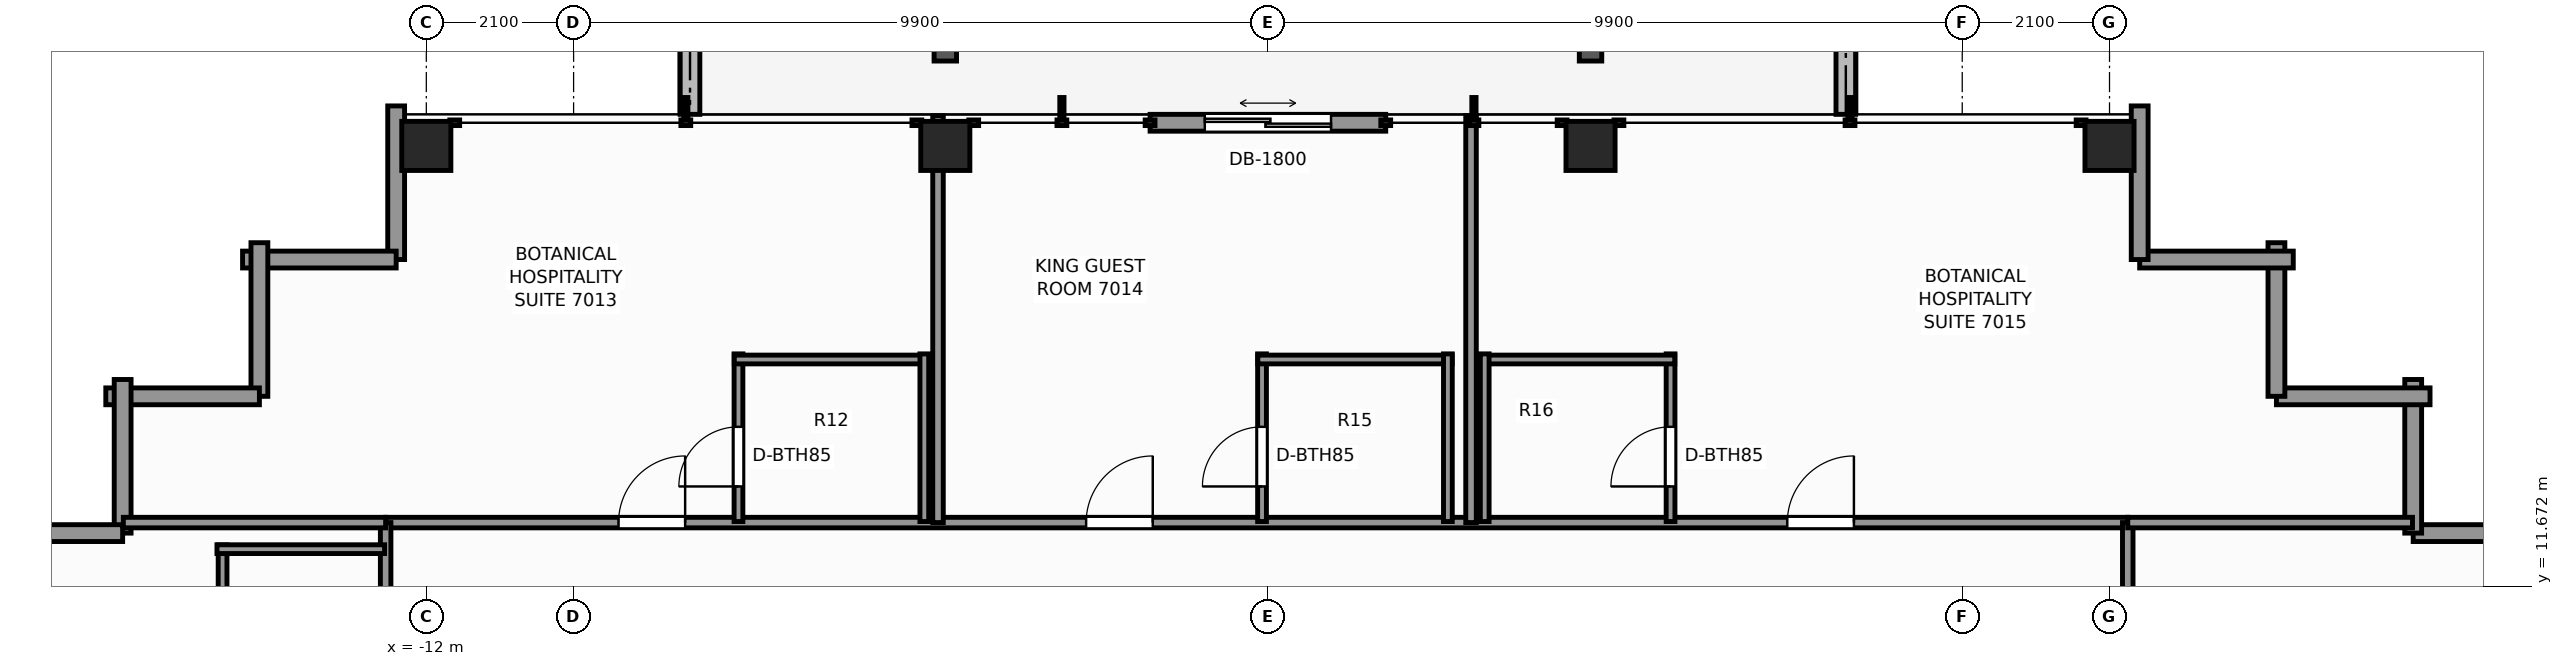
"""IFC4 building model, lengths in metres.
Left out: names, types, materials, properties, quantities, classifications, styles, units other than length and angle.
Written with IfcOpenShell. Run it as: python <this file> out.ifc"""

import sys

from ifc_helpers import new_model, si_unit, direction, frame, frame_2d, origin, origin_2d, place, context, subcontext, project, spatial, rectangle, extrude, element, fill, save


model = new_model("IFC4")
c1 = context("Model", 3, precision=1e-05, world=origin(), true_north=direction((0.0, 1.0)))
c2 = subcontext(c1, "Body", "Model", "MODEL_VIEW")
j1 = project(units=[si_unit("LENGTHUNIT", "METRE"), si_unit("PLANEANGLEUNIT", "RADIAN")], contexts=[c1])
p1 = place(None, origin())
s1 = spatial("IfcSite", under=j1, at=p1, CompositionType="ELEMENT")
p2 = place(p1, origin())
s2 = spatial("IfcBuilding", under=s1, at=p2, CompositionType="ELEMENT")
p3 = place(p2, frame((0.0, 0.0, 240.9)))
s3 = spatial("IfcBuildingStorey", under=s2, at=p3, CompositionType="ELEMENT", Elevation=240.9)
for number, where, z_axis, x_axis in (
    (1, (-12.0, 17.95, 0.0), (0.0, 0.0, 1.0), (1.0, 0.0, 0.0)),
    (2, (-4.6, 17.95, 0.0), (0.0, 0.0, 1.0), (1.0, 0.0, 0.0)),
    (3, (4.6, 17.95, 0.0), (0.0, 0.0, 1.0), (1.0, 0.0, 0.0)),
    (4, (12.0, 17.95, 0.0), (0.0, 0.0, 1.0), (1.0, 0.0, 0.0)),
):
    element("IfcColumn", number, at=place(p3, frame(where, z_axis=z_axis, x_axis=x_axis)), inside=s3, PredefinedType="COLUMN", context=c2, shape_type="SweptSolid", body=[
        extrude(rectangle(XDim=0.7, YDim=0.7, at=origin_2d()), origin(), (0.0, 0.0, 1.0), 3.5),
    ])
p4 = place(p3, frame((8.24, 18.4, -0.07), z_axis=(0.0, 0.0, 1.0), x_axis=(0.0, 1.0, 0.0)))
e5 = element("IfcWall", 5, at=p4, inside=s3, PredefinedType="PARAPET", context=c2, shape_type="SweptSolid", body=[
    extrude(rectangle(XDim=1.313, YDim=0.28, at=frame_2d((0.656, 0.0))), origin(), (0.0, 0.0, 1.0), 0.42),
])
p5 = place(p3, frame((-8.24, 20.74, -0.07), z_axis=(0.0, 0.0, 1.0), x_axis=(0.0, -1.0, 0.0)))
e6 = element("IfcWall", 6, at=p5, inside=s3, PredefinedType="PARAPET", context=c2, shape_type="SweptSolid", body=[
    extrude(rectangle(XDim=2.34, YDim=0.28, at=frame_2d((1.17, 0.0))), origin(), (0.0, 0.0, 1.0), 0.42),
])
p6 = place(p3, frame((16.33, 12.43, 0.0), z_axis=(0.0, 0.0, 1.0), x_axis=(1.0, 0.0, 0.0)))
e7 = element("IfcWall", 7, at=p6, inside=s3, PredefinedType="STANDARD", context=c2, shape_type="SweptSolid", body=[
    extrude(rectangle(XDim=2.19, YDim=0.24, at=frame_2d((1.095, 0.0))), origin(), (0.0, 0.0, 1.0), 2.633),
])
for number, where, z_axis, x_axis in (
    (8, (16.33, 14.62, 0.0), (0.0, 0.0, 1.0), (0.0, -1.0, 0.0)),
    (9, (14.38, 14.38, 0.0), (0.0, 0.0, 1.0), (1.0, 0.0, 0.0)),
    (10, (14.38, 16.57, 0.0), (0.0, 0.0, 1.0), (0.0, -1.0, 0.0)),
    (11, (12.43, 16.33, 0.0), (0.0, 0.0, 1.0), (1.0, 0.0, 0.0)),
):
    element("IfcWall", number, at=place(p3, frame(where, z_axis=z_axis, x_axis=x_axis)), inside=s3, PredefinedType="STANDARD", context=c2, shape_type="SweptSolid", body=[
        extrude(rectangle(XDim=2.19, YDim=0.24, at=frame_2d((1.095, 0.0))), origin(), (0.0, 0.0, 1.0), 2.633),
    ])
p7 = place(p3, frame((12.43, 18.52, 0.0), z_axis=(0.0, 0.0, 1.0), x_axis=(0.0, -1.0, 0.0)))
e12 = element("IfcWall", 12, at=p7, inside=s3, PredefinedType="STANDARD", context=c2, shape_type="SweptSolid", body=[
    extrude(rectangle(XDim=2.19, YDim=0.24, at=frame_2d((1.095, 0.0))), origin(), (0.0, 0.0, 1.0), 2.633),
])
p8 = place(p3, frame((-1.68, 18.28, 0.0), z_axis=(0.0, 0.0, 1.0), x_axis=(1.0, 0.0, 0.0)))
e13 = element("IfcWall", 13, at=p8, inside=s3, PredefinedType="STANDARD", context=c2, shape_type="SweptSolid", body=[
    extrude(rectangle(XDim=3.36, YDim=0.24, at=frame_2d((1.68, 0.0))), origin(), (0.0, 0.0, 1.0), 3.25),
])
p9 = place(p8, frame((0.78, 0.0, 0.0)))
e14 = element("IfcOpeningElement", 14, at=p9, cuts=e13, PredefinedType="OPENING", context=c2, shape_type="SweptSolid", body=[
    extrude(rectangle(XDim=1.8, YDim=2.2, at=frame_2d((0.9, 1.1))), frame((0.0, 0.13, 0.0), z_axis=(0.0, -1.0, 0.0), x_axis=(1.0, 0.0, 0.0)), (0.0, 0.0, 1.0), 0.26),
])
p10 = place(p3, frame((-12.43, 16.33, 0.0), z_axis=(0.0, 0.0, 1.0), x_axis=(0.0, 1.0, 0.0)))
e15 = element("IfcWall", 15, at=p10, inside=s3, PredefinedType="STANDARD", context=c2, shape_type="SweptSolid", body=[
    extrude(rectangle(XDim=2.19, YDim=0.24, at=frame_2d((1.095, 0.0))), origin(), (0.0, 0.0, 1.0), 2.633),
])
for number, where, z_axis, x_axis in (
    (16, (-14.62, 16.33, 0.0), (0.0, 0.0, 1.0), (1.0, 0.0, 0.0)),
    (17, (-14.38, 14.38, 0.0), (0.0, 0.0, 1.0), (0.0, 1.0, 0.0)),
    (18, (-16.57, 14.38, 0.0), (0.0, 0.0, 1.0), (1.0, 0.0, 0.0)),
    (19, (-16.33, 12.43, 0.0), (0.0, 0.0, 1.0), (0.0, 1.0, 0.0)),
):
    element("IfcWall", number, at=place(p3, frame(where, z_axis=z_axis, x_axis=x_axis)), inside=s3, PredefinedType="STANDARD", context=c2, shape_type="SweptSolid", body=[
        extrude(rectangle(XDim=2.19, YDim=0.24, at=frame_2d((1.095, 0.0))), origin(), (0.0, 0.0, 1.0), 2.633),
    ])
p11 = place(p3, frame((-18.52, 12.43, 0.0), z_axis=(0.0, 0.0, 1.0), x_axis=(1.0, 0.0, 0.0)))
e20 = element("IfcWall", 20, at=p11, inside=s3, PredefinedType="STANDARD", context=c2, shape_type="SweptSolid", body=[
    extrude(rectangle(XDim=2.19, YDim=0.24, at=frame_2d((1.095, 0.0))), origin(), (0.0, 0.0, 1.0), 2.633),
])
p12 = place(p3, frame((-12.58, 12.58, 0.0), z_axis=(0.0, 0.0, 1.0), x_axis=(1.0, 0.0, 0.0)))
e21 = element("IfcWall", 21, at=p12, inside=s3, PredefinedType="PARTITIONING", context=c2, shape_type="SweptSolid", body=[
    extrude(rectangle(XDim=24.84, YDim=0.15, at=frame_2d((12.42, 0.0))), origin(), (0.0, 0.0, 1.0), 2.539),
])
p13 = place(p12, frame((3.321, 0.0, 0.0)))
e22 = element("IfcOpeningElement", 22, at=p13, cuts=e21, PredefinedType="OPENING", context=c2, shape_type="SweptSolid", body=[
    extrude(rectangle(XDim=0.95, YDim=2.06, at=frame_2d((0.475, 1.03))), frame((0.0, 0.085, 0.0), z_axis=(0.0, -1.0, 0.0), x_axis=(1.0, 0.0, 0.0)), (0.0, 0.0, 1.0), 0.17),
])
p14 = place(p12, frame((9.988, 0.0, 0.0)))
e23 = element("IfcOpeningElement", 23, at=p14, cuts=e21, PredefinedType="OPENING", context=c2, shape_type="SweptSolid", body=[
    extrude(rectangle(XDim=0.95, YDim=2.06, at=frame_2d((0.475, 1.03))), frame((0.0, 0.085, 0.0), z_axis=(0.0, -1.0, 0.0), x_axis=(1.0, 0.0, 0.0)), (0.0, 0.0, 1.0), 0.17),
])
p15 = place(p12, frame((19.986, 0.0, 0.0)))
e24 = element("IfcOpeningElement", 24, at=p15, cuts=e21, PredefinedType="OPENING", context=c2, shape_type="SweptSolid", body=[
    extrude(rectangle(XDim=0.95, YDim=2.06, at=frame_2d((0.475, 1.03))), frame((0.0, 0.085, 0.0), z_axis=(0.0, -1.0, 0.0), x_axis=(1.0, 0.0, 0.0)), (0.0, 0.0, 1.0), 0.17),
])
p16 = place(p3, frame((-12.58, -12.26, 0.0), z_axis=(0.0, 0.0, 1.0), x_axis=(0.0, 1.0, 0.0)))
e25 = element("IfcWall", 25, at=p16, inside=s3, PredefinedType="PARTITIONING", context=c2, shape_type="SweptSolid", body=[
    extrude(rectangle(XDim=24.84, YDim=0.15, at=frame_2d((12.42, 0.0))), origin(), (0.0, 0.0, 1.0), 2.539),
])
p17 = place(p16, frame((2.686, 0.0, 0.0)))
e26 = element("IfcOpeningElement", 26, at=p17, cuts=e25, PredefinedType="OPENING", context=c2, shape_type="SweptSolid", body=[
    extrude(rectangle(XDim=0.9, YDim=2.06, at=frame_2d((0.45, 1.03))), frame((0.0, 0.085, 0.0), z_axis=(0.0, -1.0, 0.0), x_axis=(1.0, 0.0, 0.0)), (0.0, 0.0, 1.0), 0.17),
])
p18 = place(p16, frame((4.385, 0.0, 0.0)))
e27 = element("IfcOpeningElement", 27, at=p18, cuts=e25, PredefinedType="OPENING", context=c2, shape_type="SweptSolid", body=[
    extrude(rectangle(XDim=0.95, YDim=2.06, at=frame_2d((0.475, 1.03))), frame((0.0, 0.085, 0.0), z_axis=(0.0, -1.0, 0.0), x_axis=(1.0, 0.0, 0.0)), (0.0, 0.0, 1.0), 0.17),
])
p19 = place(p16, frame((13.796, 0.0, 0.0)))
e28 = element("IfcOpeningElement", 28, at=p19, cuts=e25, PredefinedType="OPENING", context=c2, shape_type="SweptSolid", body=[
    extrude(rectangle(XDim=0.95, YDim=2.06, at=frame_2d((0.475, 1.03))), frame((0.0, 0.085, 0.0), z_axis=(0.0, -1.0, 0.0), x_axis=(1.0, 0.0, 0.0)), (0.0, 0.0, 1.0), 0.17),
])
p20 = place(p16, frame((18.242, 0.0, 0.0)))
e29 = element("IfcOpeningElement", 29, at=p20, cuts=e25, PredefinedType="OPENING", context=c2, shape_type="SweptSolid", body=[
    extrude(rectangle(XDim=0.9, YDim=2.06, at=frame_2d((0.45, 1.03))), frame((0.0, 0.085, 0.0), z_axis=(0.0, -1.0, 0.0), x_axis=(1.0, 0.0, 0.0)), (0.0, 0.0, 1.0), 0.17),
])
p21 = place(p16, frame((20.059, 0.0, 0.0)))
e30 = element("IfcOpeningElement", 30, at=p21, cuts=e25, PredefinedType="OPENING", context=c2, shape_type="SweptSolid", body=[
    extrude(rectangle(XDim=0.95, YDim=2.06, at=frame_2d((0.475, 1.03))), frame((0.0, 0.085, 0.0), z_axis=(0.0, -1.0, 0.0), x_axis=(1.0, 0.0, 0.0)), (0.0, 0.0, 1.0), 0.17),
])
p22 = place(p3, frame((12.26, -12.26, 0.0), z_axis=(0.0, 0.0, 1.0), x_axis=(0.0, 1.0, 0.0)))
e31 = element("IfcWall", 31, at=p22, inside=s3, PredefinedType="PARTITIONING", context=c2, shape_type="SweptSolid", body=[
    extrude(rectangle(XDim=24.84, YDim=0.15, at=frame_2d((12.42, 0.0))), origin(), (0.0, 0.0, 1.0), 2.539),
])
p23 = place(p22, frame((4.275, 0.0, 0.0)))
e32 = element("IfcOpeningElement", 32, at=p23, cuts=e31, PredefinedType="OPENING", context=c2, shape_type="SweptSolid", body=[
    extrude(rectangle(XDim=0.9, YDim=2.06, at=frame_2d((0.45, 1.03))), frame((0.0, 0.085, 0.0), z_axis=(0.0, -1.0, 0.0), x_axis=(1.0, 0.0, 0.0)), (0.0, 0.0, 1.0), 0.17),
])
p24 = place(p22, frame((9.966, 0.0, 0.0)))
e33 = element("IfcOpeningElement", 33, at=p24, cuts=e31, PredefinedType="OPENING", context=c2, shape_type="SweptSolid", body=[
    extrude(rectangle(XDim=0.95, YDim=2.06, at=frame_2d((0.475, 1.03))), frame((0.0, 0.085, 0.0), z_axis=(0.0, -1.0, 0.0), x_axis=(1.0, 0.0, 0.0)), (0.0, 0.0, 1.0), 0.17),
])
p25 = place(p22, frame((18.653, 0.0, 0.0)))
e34 = element("IfcOpeningElement", 34, at=p25, cuts=e31, PredefinedType="OPENING", context=c2, shape_type="SweptSolid", body=[
    extrude(rectangle(XDim=0.95, YDim=2.06, at=frame_2d((0.475, 1.03))), frame((0.0, 0.085, 0.0), z_axis=(0.0, -1.0, 0.0), x_axis=(1.0, 0.0, 0.0)), (0.0, 0.0, 1.0), 0.17),
])
p26 = place(p22, frame((20.836, 0.0, 0.0)))
e35 = element("IfcOpeningElement", 35, at=p26, cuts=e31, PredefinedType="OPENING", context=c2, shape_type="SweptSolid", body=[
    extrude(rectangle(XDim=0.9, YDim=2.06, at=frame_2d((0.45, 1.03))), frame((0.0, 0.085, 0.0), z_axis=(0.0, -1.0, 0.0), x_axis=(1.0, 0.0, 0.0)), (0.0, 0.0, 1.0), 0.17),
])
p27 = place(p3, frame((-16.32, 12.58, 0.0), z_axis=(0.0, 0.0, 1.0), x_axis=(1.0, 0.0, 0.0)))
e36 = element("IfcWall", 36, at=p27, inside=s3, PredefinedType="PARTITIONING", context=c2, shape_type="SweptSolid", body=[
    extrude(rectangle(XDim=3.74, YDim=0.15, at=frame_2d((1.87, 0.0))), origin(), (0.0, 0.0, 1.0), 3.25),
])
p28 = place(p3, frame((12.26, 12.58, 0.0), z_axis=(0.0, 0.0, 1.0), x_axis=(1.0, 0.0, 0.0)))
e37 = element("IfcWall", 37, at=p28, inside=s3, PredefinedType="PARTITIONING", context=c2, shape_type="SweptSolid", body=[
    extrude(rectangle(XDim=4.06, YDim=0.15, at=frame_2d((2.03, 0.0))), origin(), (0.0, 0.0, 1.0), 3.25),
])
p29 = place(p3, frame((-14.905, 9.491, 0.0), z_axis=(0.0, 0.0, 1.0), x_axis=(0.0, 1.0, 0.0)))
e38 = element("IfcWall", 38, at=p29, inside=s3, PredefinedType="PARTITIONING", context=c2, shape_type="SweptSolid", body=[
    extrude(rectangle(XDim=2.77, YDim=0.125, at=frame_2d((1.385, 0.0))), origin(), (0.0, 0.0, 1.0), 2.539),
])
p30 = place(p3, frame((-14.985, 12.201, 0.0), z_axis=(0.0, 0.0, 1.0), x_axis=(1.0, 0.0, 0.0)))
e39 = element("IfcWall", 39, at=p30, inside=s3, PredefinedType="PARTITIONING", context=c2, shape_type="SweptSolid", body=[
    extrude(rectangle(XDim=2.39, YDim=0.125, at=frame_2d((1.195, 0.0))), origin(), (0.0, 0.0, 1.0), 3.25),
])
p31 = place(p3, frame((-4.704, 12.58, 0.0), z_axis=(0.0, 0.0, 1.0), x_axis=(0.0, 1.0, 0.0)))
e40 = element("IfcWall", 40, at=p31, inside=s3, PredefinedType="PARTITIONING", context=c2, shape_type="SweptSolid", body=[
    extrude(rectangle(XDim=5.8, YDim=0.15, at=frame_2d((2.9, 0.0))), origin(), (0.0, 0.0, 1.0), 2.539),
])
p32 = place(p3, frame((-7.549, 12.595, 0.0), z_axis=(0.0, 0.0, 1.0), x_axis=(0.0, 1.0, 0.0)))
e41 = element("IfcWall", 41, at=p32, inside=s3, PredefinedType="PARTITIONING", context=c2, shape_type="SweptSolid", body=[
    extrude(rectangle(XDim=2.39, YDim=0.125, at=frame_2d((1.195, 0.0))), origin(), (0.0, 0.0, 1.0), 3.25),
])
p33 = place(p32, frame((0.5, 0.0, 0.0)))
e42 = element("IfcOpeningElement", 42, at=p33, cuts=e41, PredefinedType="OPENING", context=c2, shape_type="SweptSolid", body=[
    extrude(rectangle(XDim=0.85, YDim=2.03, at=frame_2d((0.425, 1.015))), frame((0.0, 0.073, 0.0), z_axis=(0.0, -1.0, 0.0), x_axis=(1.0, 0.0, 0.0)), (0.0, 0.0, 1.0), 0.145),
])
p34 = place(p3, frame((-7.609, 14.905, 0.0), z_axis=(0.0, 0.0, 1.0), x_axis=(1.0, 0.0, 0.0)))
e43 = element("IfcWall", 43, at=p34, inside=s3, PredefinedType="PARTITIONING", context=c2, shape_type="SweptSolid", body=[
    extrude(rectangle(XDim=2.77, YDim=0.125, at=frame_2d((1.385, 0.0))), origin(), (0.0, 0.0, 1.0), 3.25),
])
p35 = place(p3, frame((-4.899, 12.595, 0.0), z_axis=(0.0, 0.0, 1.0), x_axis=(0.0, 1.0, 0.0)))
e44 = element("IfcWall", 44, at=p35, inside=s3, PredefinedType="PARTITIONING", context=c2, shape_type="SweptSolid", body=[
    extrude(rectangle(XDim=2.39, YDim=0.125, at=frame_2d((1.195, 0.0))), origin(), (0.0, 0.0, 1.0), 3.25),
])
p36 = place(p3, frame((2.896, 12.58, 0.0), z_axis=(0.0, 0.0, 1.0), x_axis=(0.0, 1.0, 0.0)))
e45 = element("IfcWall", 45, at=p36, inside=s3, PredefinedType="PARTITIONING", context=c2, shape_type="SweptSolid", body=[
    extrude(rectangle(XDim=5.8, YDim=0.15, at=frame_2d((2.9, 0.0))), origin(), (0.0, 0.0, 1.0), 2.623),
])
p37 = place(p3, frame((-0.084, 12.595, 0.0), z_axis=(0.0, 0.0, 1.0), x_axis=(0.0, 1.0, 0.0)))
e46 = element("IfcWall", 46, at=p37, inside=s3, PredefinedType="PARTITIONING", context=c2, shape_type="SweptSolid", body=[
    extrude(rectangle(XDim=2.39, YDim=0.125, at=frame_2d((1.195, 0.0))), origin(), (0.0, 0.0, 1.0), 2.775),
])
p38 = place(p37, frame((0.5, 0.0, 0.0)))
e47 = element("IfcOpeningElement", 47, at=p38, cuts=e46, PredefinedType="OPENING", context=c2, shape_type="SweptSolid", body=[
    extrude(rectangle(XDim=0.85, YDim=2.03, at=frame_2d((0.425, 1.015))), frame((0.0, 0.073, 0.0), z_axis=(0.0, -1.0, 0.0), x_axis=(1.0, 0.0, 0.0)), (0.0, 0.0, 1.0), 0.145),
])
p39 = place(p3, frame((-0.144, 14.905, 0.0), z_axis=(0.0, 0.0, 1.0), x_axis=(1.0, 0.0, 0.0)))
e48 = element("IfcWall", 48, at=p39, inside=s3, PredefinedType="PARTITIONING", context=c2, shape_type="SweptSolid", body=[
    extrude(rectangle(XDim=2.77, YDim=0.125, at=frame_2d((1.385, 0.0))), origin(), (0.0, 0.0, 1.0), 2.775),
])
p40 = place(p3, frame((2.566, 12.595, 0.0), z_axis=(0.0, 0.0, 1.0), x_axis=(0.0, 1.0, 0.0)))
e49 = element("IfcWall", 49, at=p40, inside=s3, PredefinedType="PARTITIONING", context=c2, shape_type="SweptSolid", body=[
    extrude(rectangle(XDim=2.39, YDim=0.125, at=frame_2d((1.195, 0.0))), origin(), (0.0, 0.0, 1.0), 3.25),
])
p41 = place(p3, frame((5.741, 12.595, 0.0), z_axis=(0.0, 0.0, 1.0), x_axis=(0.0, 1.0, 0.0)))
e50 = element("IfcWall", 50, at=p41, inside=s3, PredefinedType="PARTITIONING", context=c2, shape_type="SweptSolid", body=[
    extrude(rectangle(XDim=2.39, YDim=0.125, at=frame_2d((1.195, 0.0))), origin(), (0.0, 0.0, 1.0), 3.25),
])
p42 = place(p41, frame((0.5, 0.0, 0.0)))
e51 = element("IfcOpeningElement", 51, at=p42, cuts=e50, PredefinedType="OPENING", context=c2, shape_type="SweptSolid", body=[
    extrude(rectangle(XDim=0.85, YDim=2.03, at=frame_2d((0.425, 1.015))), frame((0.0, 0.073, 0.0), z_axis=(0.0, -1.0, 0.0), x_axis=(1.0, 0.0, 0.0)), (0.0, 0.0, 1.0), 0.145),
])
p43 = place(p3, frame((3.031, 14.905, 0.0), z_axis=(0.0, 0.0, 1.0), x_axis=(1.0, 0.0, 0.0)))
e52 = element("IfcWall", 52, at=p43, inside=s3, PredefinedType="PARTITIONING", context=c2, shape_type="SweptSolid", body=[
    extrude(rectangle(XDim=2.77, YDim=0.125, at=frame_2d((1.385, 0.0))), origin(), (0.0, 0.0, 1.0), 2.539),
])
p44 = place(p3, frame((3.091, 12.595, 0.0), z_axis=(0.0, 0.0, 1.0), x_axis=(0.0, 1.0, 0.0)))
e53 = element("IfcWall", 53, at=p44, inside=s3, PredefinedType="PARTITIONING", context=c2, shape_type="SweptSolid", body=[
    extrude(rectangle(XDim=2.39, YDim=0.125, at=frame_2d((1.195, 0.0))), origin(), (0.0, 0.0, 1.0), 3.25),
])
p45 = place(p9, origin())
e54 = element("IfcDoor", 54, at=p45, inside=s3, OperationType="DOUBLE_DOOR_SLIDING", PredefinedType="DOOR", context=c2, shape_type="SweptSolid", body=[
    extrude(rectangle(XDim=1.8, YDim=2.2, at=frame_2d((0.9, 1.1))), frame((0.0, 0.025, 0.0), z_axis=(0.0, -1.0, 0.0), x_axis=(1.0, 0.0, 0.0)), (0.0, 0.0, 1.0), 0.05),
])
fill(e14, e54)
p46 = place(p33, origin())
e55 = element("IfcDoor", 55, at=p46, inside=s3, OperationType="SINGLE_SWING_LEFT", PredefinedType="DOOR", context=c2, shape_type="SweptSolid", body=[
    extrude(rectangle(XDim=0.85, YDim=2.03, at=frame_2d((0.425, 1.015))), frame((0.0, 0.025, 0.0), z_axis=(0.0, -1.0, 0.0), x_axis=(1.0, 0.0, 0.0)), (0.0, 0.0, 1.0), 0.05),
])
fill(e42, e55)
p47 = place(p13, origin())
e56 = element("IfcDoor", 56, at=p47, inside=s3, OperationType="SINGLE_SWING_RIGHT", PredefinedType="DOOR", context=c2, shape_type="SweptSolid", body=[
    extrude(rectangle(XDim=0.95, YDim=2.06, at=frame_2d((0.475, 1.03))), frame((0.0, 0.025, 0.0), z_axis=(0.0, -1.0, 0.0), x_axis=(1.0, 0.0, 0.0)), (0.0, 0.0, 1.0), 0.05),
])
fill(e22, e56)
p48 = place(p38, origin())
e57 = element("IfcDoor", 57, at=p48, inside=s3, OperationType="SINGLE_SWING_LEFT", PredefinedType="DOOR", context=c2, shape_type="SweptSolid", body=[
    extrude(rectangle(XDim=0.85, YDim=2.03, at=frame_2d((0.425, 1.015))), frame((0.0, 0.025, 0.0), z_axis=(0.0, -1.0, 0.0), x_axis=(1.0, 0.0, 0.0)), (0.0, 0.0, 1.0), 0.05),
])
fill(e47, e57)
p49 = place(p14, origin())
e58 = element("IfcDoor", 58, at=p49, inside=s3, OperationType="SINGLE_SWING_RIGHT", PredefinedType="DOOR", context=c2, shape_type="SweptSolid", body=[
    extrude(rectangle(XDim=0.95, YDim=2.06, at=frame_2d((0.475, 1.03))), frame((0.0, 0.025, 0.0), z_axis=(0.0, -1.0, 0.0), x_axis=(1.0, 0.0, 0.0)), (0.0, 0.0, 1.0), 0.05),
])
fill(e23, e58)
p50 = place(p42, origin())
e59 = element("IfcDoor", 59, at=p50, inside=s3, OperationType="SINGLE_SWING_LEFT", PredefinedType="DOOR", context=c2, shape_type="SweptSolid", body=[
    extrude(rectangle(XDim=0.85, YDim=2.03, at=frame_2d((0.425, 1.015))), frame((0.0, 0.025, 0.0), z_axis=(0.0, -1.0, 0.0), x_axis=(1.0, 0.0, 0.0)), (0.0, 0.0, 1.0), 0.05),
])
fill(e51, e59)
p51 = place(p15, origin())
e60 = element("IfcDoor", 60, at=p51, inside=s3, OperationType="SINGLE_SWING_RIGHT", PredefinedType="DOOR", context=c2, shape_type="SweptSolid", body=[
    extrude(rectangle(XDim=0.95, YDim=2.06, at=frame_2d((0.475, 1.03))), frame((0.0, 0.025, 0.0), z_axis=(0.0, -1.0, 0.0), x_axis=(1.0, 0.0, 0.0)), (0.0, 0.0, 1.0), 0.05),
])
fill(e24, e60)
save(model, sys.argv[1])
